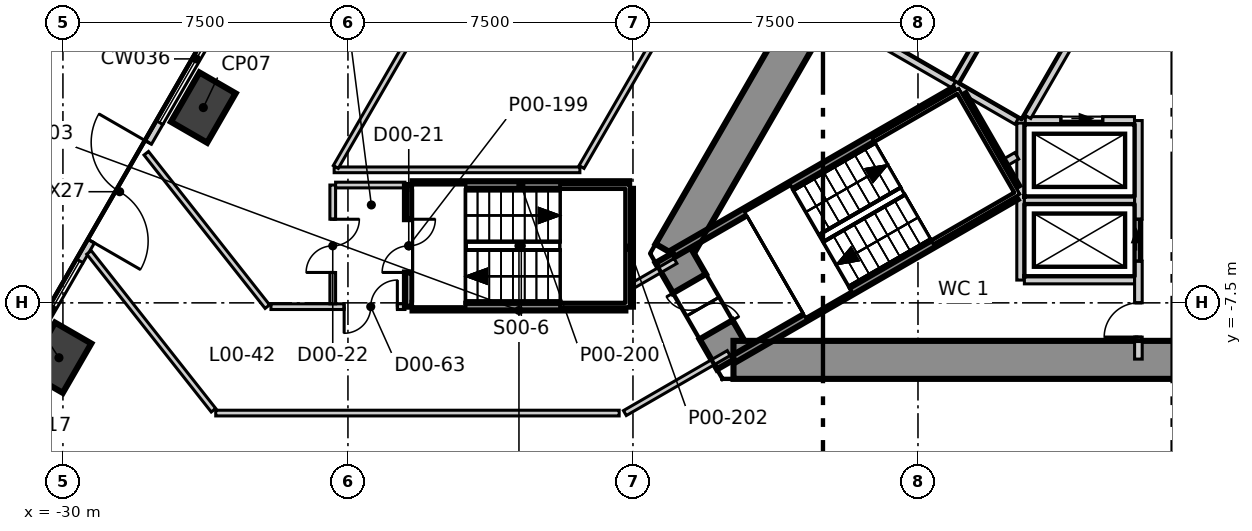
"""IFC4 building model, lengths in metres.
Left out: names, types, materials, properties, quantities, classifications, styles, units other than length and angle.
Written with IfcOpenShell. Run it as: python <this file> out.ifc"""

import sys

from ifc_helpers import new_model, si_unit, direction, frame, frame_2d, origin, origin_2d, place, context, subcontext, project, spatial, polyline, rectangle, outline, extrude, element, fill, save


model = new_model("IFC4")
c1 = context("Model", 3, precision=1e-05, world=origin(), true_north=direction((0.0, 1.0)))
c2 = subcontext(c1, "Body", "Model", "MODEL_VIEW")
j1 = project(units=[si_unit("LENGTHUNIT", "METRE"), si_unit("PLANEANGLEUNIT", "RADIAN")], contexts=[c1])
p1 = place(None, origin())
s1 = spatial("IfcSite", under=j1, at=p1, CompositionType="ELEMENT")
p2 = place(p1, origin())
s2 = spatial("IfcBuilding", under=s1, at=p2, CompositionType="ELEMENT")
p3 = place(p2, origin())
s3 = spatial("IfcBuildingStorey", under=s2, at=p3, CompositionType="ELEMENT", Elevation=0.0)
p4 = place(p3, frame((-1.617, 15.2, -0.4), z_axis=(0.0, 0.0, 1.0), x_axis=(-0.499992141631, -0.866029940768, 0.0)))
e1 = element("IfcWall", 1, at=p4, inside=s3, PredefinedType="SHEAR", context=c2, shape_type="SweptSolid", body=[
    extrude(outline(polyline([(-0.289, -0.499), (1.656, -0.499), (3.601, -0.499), (5.547, -0.499), (7.492, -0.499), (9.437, -0.5), (11.382, -0.5), (13.328, -0.5), (15.273, -0.5), (17.218, -0.5), (19.163, -0.5), (21.109, -0.5), (23.054, -0.5), (24.999, -0.5), (24.422, 0.5), (22.566, 0.5), (20.709, 0.5), (18.853, 0.5), (16.997, 0.5), (15.14, 0.5), (13.284, 0.5), (11.427, 0.5), (9.571, 0.5), (7.715, 0.5), (5.858, 0.5), (4.002, 0.5), (2.146, 0.5), (0.289, 0.5), (-0.289, -0.499)])), origin(), (0.0, 0.0, 1.0), 8.5),
])
p5 = place(p4, frame((11.805, 0.0, 0.4)))
e2 = element("IfcOpeningElement", 2, at=p5, cuts=e1, PredefinedType="OPENING", context=c2, shape_type="SweptSolid", body=[
    extrude(rectangle(XDim=1.1, YDim=2.1, at=frame_2d((0.55, 1.05))), frame((0.0, 0.51, 0.0), z_axis=(0.0, -1.0, 0.0), x_axis=(1.0, 0.0, 0.0)), (0.0, 0.0, 1.0), 1.02),
])
p6 = place(p3, frame((-13.972, -6.2, -0.4), z_axis=(0.0, 0.0, 1.0), x_axis=(0.500077567175, -0.865980615723, 0.0)))
e3 = element("IfcWall", 3, at=p6, inside=s3, PredefinedType="SHEAR", context=c2, shape_type="SweptSolid", body=[
    extrude(outline(polyline([(-0.289, -0.5), (1.616, -0.5), (3.522, -0.5), (2.944, 0.499), (1.617, 0.5), (0.289, 0.5), (-0.289, -0.5)])), origin(), (0.0, 0.0, 1.0), 8.5),
])
p7 = place(p6, frame((0.917, 0.0, 0.4)))
e4 = element("IfcOpeningElement", 4, at=p7, cuts=e3, PredefinedType="OPENING", context=c2, shape_type="SweptSolid", body=[
    extrude(rectangle(XDim=1.4, YDim=2.1, at=frame_2d((0.7, 1.05))), frame((0.0, 0.51, 0.0), z_axis=(0.0, -1.0, 0.0), x_axis=(1.0, 0.0, 0.0)), (0.0, 0.0, 1.0), 1.02),
])
p8 = place(p3, frame((-12.355, -9.0, -0.4), z_axis=(0.0, 0.0, 1.0), x_axis=(1.0, 0.0, 0.0)))
e5 = element("IfcWall", 5, at=p8, inside=s3, PredefinedType="SHEAR", context=c2, shape_type="SweptSolid", body=[
    extrude(outline(polyline([(-0.289, -0.5), (1.656, -0.5), (3.601, -0.5), (5.547, -0.5), (7.492, -0.5), (9.437, -0.5), (11.382, -0.5), (13.328, -0.5), (15.273, -0.5), (17.218, -0.5), (19.163, -0.5), (21.109, -0.5), (23.054, -0.5), (24.999, -0.5), (24.422, 0.5), (22.566, 0.5), (20.709, 0.5), (18.853, 0.5), (16.996, 0.5), (15.14, 0.5), (13.283, 0.5), (11.427, 0.5), (9.57, 0.5), (7.714, 0.5), (5.857, 0.5), (4.001, 0.5), (2.145, 0.5), (0.288, 0.5), (-0.289, -0.5)])), origin(), (0.0, 0.0, 1.0), 8.5),
])
for number, where, z_axis, x_axis in (
    (6, (-26.306, -2.362, -0.4), (0.0, 0.0, 1.0), (0.5, 0.866, 0.0)),
    (7, (-30.105, -8.944, -0.4), (0.0, 0.0, 1.0), (0.5, 0.866, 0.0)),
):
    element("IfcColumn", number, at=place(p3, frame(where, z_axis=z_axis, x_axis=x_axis)), inside=s3, PredefinedType="COLUMN", context=c2, shape_type="SweptSolid", body=[
        extrude(rectangle(XDim=1.5, YDim=1.1, at=origin_2d()), origin(), (0.0, 0.0, 1.0), 8.5),
    ])
p9 = place(p3, frame((-27.457, -2.757, 0.0), z_axis=(0.0, 0.0, 1.0), x_axis=(-0.500126550569, -0.86595232745, 0.0)))
e8 = element("IfcWall", 8, at=p9, inside=s3, PredefinedType="ELEMENTEDWALL", context=c2, shape_type="SweptSolid", body=[
    extrude(rectangle(XDim=4.201, YDim=0.2, at=frame_2d((2.101, 0.0))), origin(), (0.0, 0.0, 1.0), 8.1),
])
p10 = place(p9, frame((0.6, 0.0, 0.0)))
e9 = element("IfcOpeningElement", 9, at=p10, cuts=e8, PredefinedType="OPENING", context=c2, shape_type="SweptSolid", body=[
    extrude(rectangle(XDim=3.0, YDim=3.2, at=frame_2d((1.5, 1.6))), frame((0.0, 0.11, 0.0), z_axis=(0.0, -1.0, 0.0), x_axis=(1.0, 0.0, 0.0)), (0.0, 0.0, 1.0), 0.22),
])
p11 = place(p3, frame((-15.213, -10.4, 0.0), z_axis=(0.0, 0.0, 1.0), x_axis=(0.86594327899, 0.500142217347, 0.0)))
e10 = element("IfcWall", 10, at=p11, inside=s3, PredefinedType="PARTITIONING", context=c2, shape_type="SweptSolid", body=[
    extrude(rectangle(XDim=3.155, YDim=0.15, at=frame_2d((1.577, 0.0))), origin(), (0.0, 0.0, 1.0), 7.25),
])
p12 = place(p3, frame((-25.979, -10.4, 0.0), z_axis=(0.0, 0.0, 1.0), x_axis=(1.0, 0.0, 0.0)))
e11 = element("IfcWall", 11, at=p12, inside=s3, PredefinedType="PARTITIONING", context=c2, shape_type="SweptSolid", body=[
    extrude(rectangle(XDim=10.616, YDim=0.15, at=frame_2d((5.308, 0.0))), origin(), (0.0, 0.0, 1.0), 8.1),
])
p13 = place(p3, frame((-29.314, -6.173, 0.0), z_axis=(0.0, 0.0, 1.0), x_axis=(0.6194227418, -0.785057620141, 0.0)))
e12 = element("IfcWall", 12, at=p13, inside=s3, PredefinedType="PARTITIONING", context=c2, shape_type="SweptSolid", body=[
    extrude(rectangle(XDim=5.289, YDim=0.15, at=frame_2d((2.644, 0.0))), origin(), (0.0, 0.0, 1.0), 8.1),
])
p14 = place(p3, frame((-27.807, -3.563, 0.0), z_axis=(0.0, 0.0, 1.0), x_axis=(0.619476498326, -0.785015202415, 0.0)))
e13 = element("IfcWall", 13, at=p14, inside=s3, PredefinedType="PARTITIONING", context=c2, shape_type="SweptSolid", body=[
    extrude(rectangle(XDim=5.143, YDim=0.15, at=frame_2d((2.571, 0.0))), origin(), (0.0, 0.0, 1.0), 8.1),
])
p15 = place(p3, frame((-24.526, -7.6, 0.0), z_axis=(0.0, 0.0, 1.0), x_axis=(1.0, 0.0, 0.0)))
e14 = element("IfcWall", 14, at=p15, inside=s3, PredefinedType="PARTITIONING", context=c2, shape_type="SweptSolid", body=[
    extrude(rectangle(XDim=3.526, YDim=0.15, at=frame_2d((1.763, 0.0))), origin(), (0.0, 0.0, 1.0), 8.1),
])
p16 = place(p15, frame((1.926, 0.0, 0.0)))
e15 = element("IfcOpeningElement", 15, at=p16, cuts=e14, PredefinedType="OPENING", context=c2, shape_type="SweptSolid", body=[
    extrude(rectangle(XDim=1.4, YDim=2.1, at=frame_2d((0.7, 1.05))), frame((0.0, 0.085, 0.0), z_axis=(0.0, -1.0, 0.0), x_axis=(1.0, 0.0, 0.0)), (0.0, 0.0, 1.0), 0.17),
])
p17 = place(p3, frame((-22.9, -7.525, 0.0), z_axis=(0.0, 0.0, 1.0), x_axis=(0.0, 1.0, 0.0)))
e16 = element("IfcWall", 16, at=p17, inside=s3, PredefinedType="PARTITIONING", context=c2, shape_type="SweptSolid", body=[
    extrude(rectangle(XDim=3.125, YDim=0.15, at=frame_2d((1.562, 0.0))), origin(), (0.0, 0.0, 1.0), 8.1),
])
p18 = place(p17, frame((0.825, 0.0, 0.0)))
e17 = element("IfcOpeningElement", 17, at=p18, cuts=e16, PredefinedType="OPENING", context=c2, shape_type="SweptSolid", body=[
    extrude(rectangle(XDim=1.4, YDim=2.1, at=frame_2d((0.7, 1.05))), frame((0.0, 0.085, 0.0), z_axis=(0.0, -1.0, 0.0), x_axis=(1.0, 0.0, 0.0)), (0.0, 0.0, 1.0), 0.17),
])
p19 = place(p3, frame((-22.825, -4.4, 0.0), z_axis=(0.0, 0.0, 1.0), x_axis=(1.0, 0.0, 0.0)))
e18 = element("IfcWall", 18, at=p19, inside=s3, PredefinedType="PARTITIONING", context=c2, shape_type="SweptSolid", body=[
    extrude(rectangle(XDim=1.825, YDim=0.15, at=frame_2d((0.913, 0.0))), origin(), (0.0, 0.0, 1.0), 8.1),
])
p20 = place(p3, frame((-15.0, -7.044, 0.0), z_axis=(0.0, 0.0, 1.0), x_axis=(0.866025099701, 0.500000526688, 0.0)))
e19 = element("IfcWall", 19, at=p20, inside=s3, PredefinedType="PARTITIONING", context=c2, shape_type="SweptSolid", body=[
    extrude(rectangle(XDim=1.292, YDim=0.15, at=frame_2d((0.646, 0.0))), origin(), (0.0, 0.0, 1.0), 8.1),
])
p21 = place(p3, frame((-22.863, -4.0, 0.0), z_axis=(0.0, 0.0, 1.0), x_axis=(1.0, 0.0, 0.0)))
e20 = element("IfcWall", 20, at=p21, inside=s3, PredefinedType="PARTITIONING", context=c2, shape_type="SweptSolid", body=[
    extrude(rectangle(XDim=6.466, YDim=0.15, at=frame_2d((3.233, 0.0))), origin(), (0.0, 0.0, 1.0), 8.1),
])
p22 = place(p3, frame((-22.82, -3.925, 0.0), z_axis=(0.0, 0.0, 1.0), x_axis=(0.500004336333, 0.866022900187, 0.0)))
e21 = element("IfcWall", 21, at=p22, inside=s3, PredefinedType="PARTITIONING", context=c2, shape_type="SweptSolid", body=[
    extrude(rectangle(XDim=13.77, YDim=0.15, at=frame_2d((6.885, 0.0))), origin(), (0.0, 0.0, 1.0), 8.1),
])
p23 = place(p22, frame((5.642, 0.0, 0.0)))
e22 = element("IfcOpeningElement", 22, at=p23, cuts=e21, PredefinedType="OPENING", context=c2, shape_type="SweptSolid", body=[
    extrude(rectangle(XDim=2.4, YDim=2.1, at=frame_2d((1.2, 1.05))), frame((0.0, 0.085, 0.0), z_axis=(0.0, -1.0, 0.0), x_axis=(1.0, 0.0, 0.0)), (0.0, 0.0, 1.0), 0.17),
])
p24 = place(p3, frame((-16.353, -3.925, 0.0), z_axis=(0.0, 0.0, 1.0), x_axis=(0.499992812315, 0.866029553557, 0.0)))
e23 = element("IfcWall", 23, at=p24, inside=s3, PredefinedType="PARTITIONING", context=c2, shape_type="SweptSolid", body=[
    extrude(rectangle(XDim=7.556, YDim=0.15, at=frame_2d((3.778, 0.0))), origin(), (0.0, 0.0, 1.0), 8.1),
])
p25 = place(p3, frame((-8.376, -0.707, 0.0), z_axis=(0.0, 0.0, 1.0), x_axis=(0.866067520717, -0.499927044236, 0.0)))
e24 = element("IfcWall", 24, at=p25, inside=s3, PredefinedType="SOLIDWALL", context=c2, shape_type="SweptSolid", body=[
    extrude(rectangle(XDim=2.1, YDim=0.2, at=frame_2d((1.05, 0.0))), origin(), (0.0, 0.0, 1.0), 8.1),
])
p26 = place(p3, frame((-4.8, -6.9, 0.0), z_axis=(0.0, 0.0, 1.0), x_axis=(0.0, 1.0, 0.0)))
e25 = element("IfcWall", 25, at=p26, inside=s3, PredefinedType="SOLIDWALL", context=c2, shape_type="SweptSolid", body=[
    extrude(rectangle(XDim=4.131, YDim=0.2, at=frame_2d((2.065, 0.0))), origin(), (0.0, 0.0, 1.0), 8.1),
])
for number, where, z_axis, x_axis in (
    (26, (-4.7, -6.9, 0.0), (0.0, 0.0, 1.0), (1.0, 0.0, 0.0)),
    (27, (-4.7, -4.8, 0.0), (0.0, 0.0, 1.0), (1.0, 0.0, 0.0)),
):
    element("IfcWall", number, at=place(p3, frame(where, z_axis=z_axis, x_axis=x_axis)), inside=s3, PredefinedType="SOLIDWALL", context=c2, shape_type="SweptSolid", body=[
        extrude(rectangle(XDim=2.9, YDim=0.2, at=frame_2d((1.45, 0.0))), origin(), (0.0, 0.0, 1.0), 8.1),
    ])
p27 = place(p3, frame((-1.7, -8.98, 0.0), z_axis=(0.0, 0.0, 1.0), x_axis=(0.0, 1.0, 0.0)))
e28 = element("IfcWall", 28, at=p27, inside=s3, PredefinedType="SOLIDWALL", context=c2, shape_type="SweptSolid", body=[
    extrude(rectangle(XDim=6.277, YDim=0.2, at=frame_2d((3.139, 0.0))), origin(), (0.0, 0.0, 1.0), 8.1),
])
p28 = place(p27, frame((2.58, 0.0, 0.0)))
e29 = element("IfcOpeningElement", 29, at=p28, cuts=e28, PredefinedType="OPENING", context=c2, shape_type="SweptSolid", body=[
    extrude(rectangle(XDim=1.1, YDim=2.1, at=frame_2d((0.55, 1.05))), frame((0.0, 0.11, 0.0), z_axis=(0.0, -1.0, 0.0), x_axis=(1.0, 0.0, 0.0)), (0.0, 0.0, 1.0), 0.22),
])
p29 = place(p27, frame((0.58, 0.0, 0.0)))
e30 = element("IfcOpeningElement", 30, at=p29, cuts=e28, PredefinedType="OPENING", context=c2, shape_type="SweptSolid", body=[
    extrude(rectangle(XDim=0.9, YDim=2.1, at=frame_2d((0.45, 1.05))), frame((0.0, 0.11, 0.0), z_axis=(0.0, -1.0, 0.0), x_axis=(1.0, 0.0, 0.0)), (0.0, 0.0, 1.0), 0.22),
])
p30 = place(p3, frame((-4.676, -2.7, 0.0), z_axis=(0.0, 0.0, 1.0), x_axis=(1.0, 0.0, 0.0)))
e31 = element("IfcWall", 31, at=p30, inside=s3, PredefinedType="SOLIDWALL", context=c2, shape_type="SweptSolid", body=[
    extrude(rectangle(XDim=2.873, YDim=0.2, at=frame_2d((1.437, 0.0))), origin(), (0.0, 0.0, 1.0), 8.1),
])
p31 = place(p30, frame((0.937, 0.0, 0.0)))
e32 = element("IfcOpeningElement", 32, at=p31, cuts=e31, PredefinedType="OPENING", context=c2, shape_type="SweptSolid", body=[
    extrude(rectangle(XDim=1.1, YDim=2.1, at=frame_2d((0.55, 1.05))), frame((0.0, 0.11, 0.0), z_axis=(0.0, -1.0, 0.0), x_axis=(1.0, 0.0, 0.0)), (0.0, 0.0, 1.0), 0.22),
])
p32 = place(p3, frame((-6.557, -1.757, 0.0), z_axis=(0.0, 0.0, 1.0), x_axis=(0.8659754619, -0.500086491905, 0.0)))
e33 = element("IfcWall", 33, at=p32, inside=s3, PredefinedType="SOLIDWALL", context=c2, shape_type="SweptSolid", body=[
    extrude(rectangle(XDim=1.916, YDim=0.2, at=frame_2d((0.958, 0.0))), origin(), (0.0, 0.0, 1.0), 8.1),
])
p33 = place(p3, frame((-6.507, -1.67, 0.0), z_axis=(0.0, 0.0, 1.0), x_axis=(0.50012328804, 0.865954211699, 0.0)))
e34 = element("IfcWall", 34, at=p33, inside=s3, PredefinedType="SOLIDWALL", context=c2, shape_type="SweptSolid", body=[
    extrude(rectangle(XDim=2.9, YDim=0.2, at=frame_2d((1.45, 0.0))), origin(), (0.0, 0.0, 1.0), 8.1),
])
p34 = place(p3, frame((-4.619, -2.6, 0.0), z_axis=(0.0, 0.0, 1.0), x_axis=(0.50009492287, 0.865970593103, 0.0)))
e35 = element("IfcWall", 35, at=p34, inside=s3, PredefinedType="SOLIDWALL", context=c2, shape_type="SweptSolid", body=[
    extrude(rectangle(XDim=2.761, YDim=0.2, at=frame_2d((1.381, 0.0))), origin(), (0.0, 0.0, 1.0), 8.1),
])
p35 = place(p3, frame((-5.195, -3.801, 0.0), z_axis=(0.0, 0.0, 1.0), x_axis=(0.86665063443, 0.498915501706, 0.0)))
e36 = element("IfcWall", 36, at=p35, inside=s3, PredefinedType="SOLIDWALL", context=c2, shape_type="SweptSolid", body=[
    extrude(rectangle(XDim=0.341, YDim=0.2, at=frame_2d((0.17, 0.0))), origin(), (0.0, 0.0, 1.0), 8.1),
])
p36 = place(p3, frame((-13.946, -6.204, 0.0), z_axis=(0.0, 0.0, 1.0), x_axis=(0.866036527536, 0.499980732602, 0.0)))
e37 = element("IfcWall", 37, at=p36, inside=s3, PredefinedType="SOLIDWALL", context=c2, shape_type="SweptSolid", body=[
    extrude(rectangle(XDim=8.564, YDim=0.2, at=frame_2d((4.282, 0.0))), origin(), (0.0, 0.0, 1.0), 8.1),
])
p37 = place(p3, frame((-6.329, -2.038, 0.0), z_axis=(0.0, 0.0, 1.0), x_axis=(0.500200581029, -0.865909567298, 0.0)))
e38 = element("IfcWall", 38, at=p37, inside=s3, PredefinedType="SOLIDWALL", context=c2, shape_type="SweptSolid", body=[
    extrude(rectangle(XDim=2.799, YDim=0.2, at=frame_2d((1.399, 0.0))), origin(), (0.0, 0.0, 1.0), 8.1),
])
p38 = place(p3, frame((-12.346, -8.976, 0.0), z_axis=(0.0, 0.0, 1.0), x_axis=(0.865987152174, 0.50006624788, 0.0)))
e39 = element("IfcWall", 39, at=p38, inside=s3, PredefinedType="SOLIDWALL", context=c2, shape_type="SweptSolid", body=[
    extrude(rectangle(XDim=8.565, YDim=0.2, at=frame_2d((4.282, 0.0))), origin(), (0.0, 0.0, 1.0), 8.1),
])
p39 = place(p3, frame((-20.9, -7.6, 0.0), z_axis=(0.0, 0.0, 1.0), x_axis=(0.0, 1.0, 0.0)))
e40 = element("IfcWall", 40, at=p39, inside=s3, PredefinedType="SOLIDWALL", context=c2, shape_type="SweptSolid", body=[
    extrude(rectangle(XDim=3.2, YDim=0.2, at=frame_2d((1.6, 0.0))), origin(), (0.0, 0.0, 1.0), 8.1),
])
p40 = place(p39, frame((0.9, 0.0, 0.0)))
e41 = element("IfcOpeningElement", 41, at=p40, cuts=e40, PredefinedType="OPENING", context=c2, shape_type="SweptSolid", body=[
    extrude(rectangle(XDim=1.4, YDim=2.1, at=frame_2d((0.7, 1.05))), frame((0.0, 0.11, 0.0), z_axis=(0.0, -1.0, 0.0), x_axis=(1.0, 0.0, 0.0)), (0.0, 0.0, 1.0), 0.22),
])
p41 = place(p3, frame((-20.8, -4.4, 0.0), z_axis=(0.0, 0.0, 1.0), x_axis=(1.0, 0.0, 0.0)))
e42 = element("IfcWall", 42, at=p41, inside=s3, PredefinedType="SOLIDWALL", context=c2, shape_type="SweptSolid", body=[
    extrude(rectangle(XDim=5.7, YDim=0.2, at=frame_2d((2.85, 0.0))), origin(), (0.0, 0.0, 1.0), 8.1),
])
p42 = place(p3, frame((-15.1, -7.6, 0.0), z_axis=(0.0, 0.0, 1.0), x_axis=(0.0, 1.0, 0.0)))
e43 = element("IfcWall", 43, at=p42, inside=s3, PredefinedType="SOLIDWALL", context=c2, shape_type="SweptSolid", body=[
    extrude(rectangle(XDim=3.1, YDim=0.2, at=frame_2d((1.55, 0.0))), origin(), (0.0, 0.0, 1.0), 8.1),
])
p43 = place(p3, frame((-20.8, -7.6, 0.0), z_axis=(0.0, 0.0, 1.0), x_axis=(1.0, 0.0, 0.0)))
e44 = element("IfcWall", 44, at=p43, inside=s3, PredefinedType="SOLIDWALL", context=c2, shape_type="SweptSolid", body=[
    extrude(rectangle(XDim=5.6, YDim=0.2, at=frame_2d((2.8, 0.0))), origin(), (0.0, 0.0, 1.0), 8.1),
])
p44 = place(p10, frame((3.0, 0.0, 0.0), z_axis=(0.0, 0.0, 1.0), x_axis=(-1.0, 0.0, 0.0)))
e45 = element("IfcDoor", 45, at=p44, inside=s3, OperationType="DOUBLE_DOOR_SINGLE_SWING", PredefinedType="DOOR", context=c2, shape_type="SweptSolid", body=[
    extrude(rectangle(XDim=3.0, YDim=3.2, at=frame_2d((1.5, 1.6))), frame((0.0, 0.025, 0.0), z_axis=(0.0, -1.0, 0.0), x_axis=(1.0, 0.0, 0.0)), (0.0, 0.0, 1.0), 0.05),
])
fill(e9, e45)
p45 = place(p31, origin())
e46 = element("IfcDoor", 46, at=p45, inside=s3, OperationType="SLIDING_TO_LEFT", PredefinedType="DOOR", context=c2, shape_type="SweptSolid", body=[
    extrude(rectangle(XDim=1.1, YDim=2.1, at=frame_2d((0.55, 1.05))), frame((0.0, 0.025, 0.0), z_axis=(0.0, -1.0, 0.0), x_axis=(1.0, 0.0, 0.0)), (0.0, 0.0, 1.0), 0.05),
])
fill(e32, e46)
p46 = place(p28, origin())
e47 = element("IfcDoor", 47, at=p46, inside=s3, OperationType="SLIDING_TO_LEFT", PredefinedType="DOOR", context=c2, shape_type="SweptSolid", body=[
    extrude(rectangle(XDim=1.1, YDim=2.1, at=frame_2d((0.55, 1.05))), frame((0.0, 0.025, 0.0), z_axis=(0.0, -1.0, 0.0), x_axis=(1.0, 0.0, 0.0)), (0.0, 0.0, 1.0), 0.05),
])
fill(e29, e47)
p47 = place(p40, origin())
e48 = element("IfcDoor", 48, at=p47, inside=s3, OperationType="DOUBLE_DOOR_SINGLE_SWING", PredefinedType="DOOR", context=c2, shape_type="SweptSolid", body=[
    extrude(rectangle(XDim=1.4, YDim=2.1, at=frame_2d((0.7, 1.05))), frame((0.0, 0.025, 0.0), z_axis=(0.0, -1.0, 0.0), x_axis=(1.0, 0.0, 0.0)), (0.0, 0.0, 1.0), 0.05),
])
fill(e41, e48)
p48 = place(p18, origin())
e49 = element("IfcDoor", 49, at=p48, inside=s3, OperationType="DOUBLE_DOOR_SINGLE_SWING", PredefinedType="DOOR", context=c2, shape_type="SweptSolid", body=[
    extrude(rectangle(XDim=1.4, YDim=2.1, at=frame_2d((0.7, 1.05))), frame((0.0, 0.025, 0.0), z_axis=(0.0, -1.0, 0.0), x_axis=(1.0, 0.0, 0.0)), (0.0, 0.0, 1.0), 0.05),
])
fill(e17, e49)
p49 = place(p7, origin())
e50 = element("IfcDoor", 50, at=p49, inside=s3, OperationType="DOUBLE_DOOR_SINGLE_SWING", PredefinedType="DOOR", context=c2, shape_type="SweptSolid", body=[
    extrude(rectangle(XDim=1.4, YDim=2.1, at=frame_2d((0.7, 1.05))), frame((0.0, 0.025, 0.0), z_axis=(0.0, -1.0, 0.0), x_axis=(1.0, 0.0, 0.0)), (0.0, 0.0, 1.0), 0.05),
])
fill(e4, e50)
p50 = place(p29, origin())
e51 = element("IfcDoor", 51, at=p50, inside=s3, OperationType="SINGLE_SWING_RIGHT", PredefinedType="DOOR", context=c2, shape_type="SweptSolid", body=[
    extrude(rectangle(XDim=0.9, YDim=2.1, at=frame_2d((0.45, 1.05))), frame((0.0, 0.025, 0.0), z_axis=(0.0, -1.0, 0.0), x_axis=(1.0, 0.0, 0.0)), (0.0, 0.0, 1.0), 0.05),
])
fill(e30, e51)
p51 = place(p16, origin())
e52 = element("IfcDoor", 52, at=p51, inside=s3, OperationType="DOUBLE_DOOR_SINGLE_SWING", PredefinedType="DOOR", context=c2, shape_type="SweptSolid", body=[
    extrude(rectangle(XDim=1.4, YDim=2.1, at=frame_2d((0.7, 1.05))), frame((0.0, 0.025, 0.0), z_axis=(0.0, -1.0, 0.0), x_axis=(1.0, 0.0, 0.0)), (0.0, 0.0, 1.0), 0.05),
])
fill(e15, e52)
save(model, sys.argv[1])
